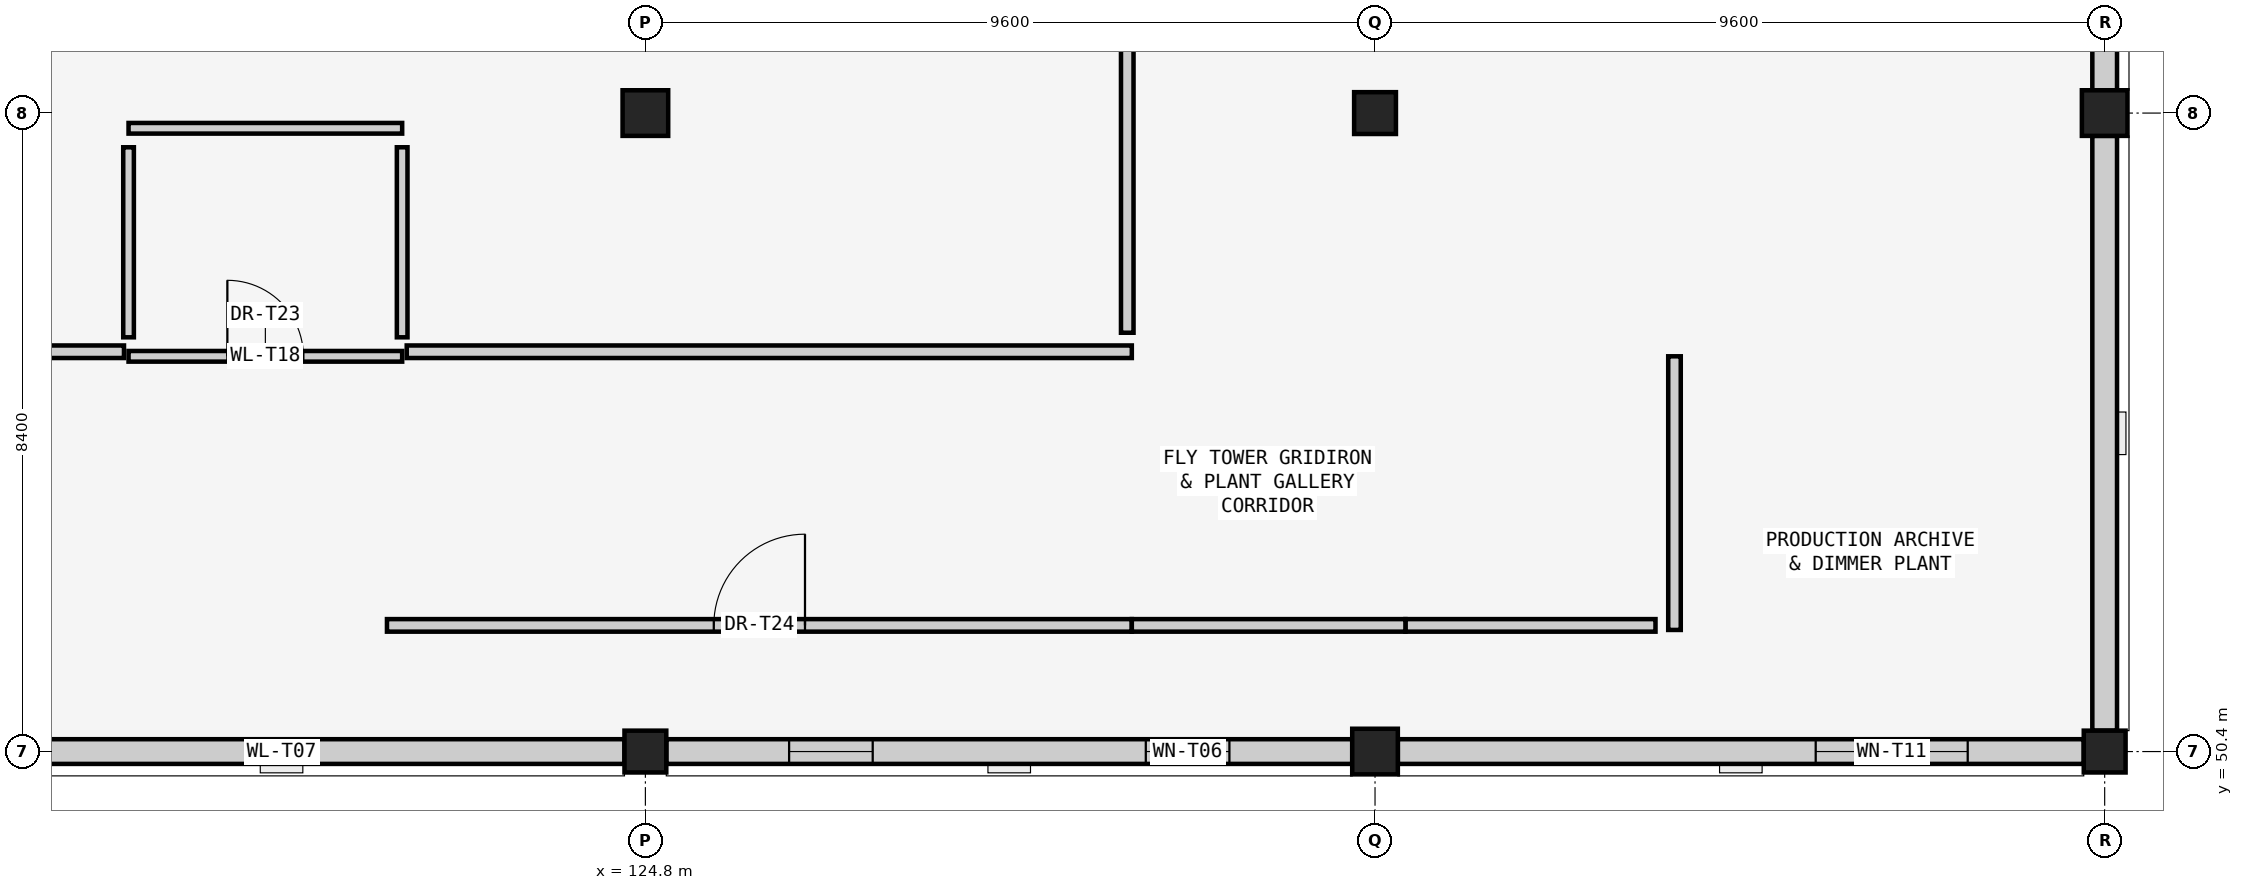
"""IFC4 building model, lengths in metres.
Left out: names, types, materials, properties, quantities, classifications, styles, units other than length and angle.
Written with IfcOpenShell. Run it as: python <this file> out.ifc"""

import sys

from ifc_helpers import new_model, si_unit, direction, frame, frame_2d, origin, origin_2d, place, context, subcontext, project, spatial, rectangle, extrude, element, fill, save


model = new_model("IFC4")
c1 = context("Model", 3, precision=1e-05, world=origin(), true_north=direction((0.0, 1.0)))
c2 = subcontext(c1, "Body", "Model", "MODEL_VIEW")
j1 = project(units=[si_unit("LENGTHUNIT", "METRE"), si_unit("PLANEANGLEUNIT", "RADIAN")], contexts=[c1])
p1 = place(None, origin())
s1 = spatial("IfcSite", under=j1, at=p1, CompositionType="ELEMENT")
p2 = place(p1, origin())
s2 = spatial("IfcBuilding", under=s1, at=p2, CompositionType="ELEMENT")
p3 = place(p2, frame((0.0, 0.0, 24.6)))
s3 = spatial("IfcBuildingStorey", under=s2, at=p3, CompositionType="ELEMENT", Elevation=24.6)
p4 = place(p3, frame((124.8, 50.4, 0.0), z_axis=(0.0, 0.0, 1.0), x_axis=(1.0, 0.0, 0.0)))
e1 = element("IfcColumn", 1, at=p4, inside=s3, PredefinedType="COLUMN", context=c2, shape_type="SweptSolid", body=[
    extrude(rectangle(XDim=0.55, YDim=0.55, at=origin_2d()), origin(), (0.0, 0.0, 1.0), 6.33),
])
for number, where, z_axis, x_axis in (
    (2, (124.8, 58.8, 0.0), (0.0, 0.0, 1.0), (1.0, 0.0, 0.0)),
    (3, (134.4, 50.4, 0.0), (0.0, 0.0, 1.0), (1.0, 0.0, 0.0)),
):
    element("IfcColumn", number, at=place(p3, frame(where, z_axis=z_axis, x_axis=x_axis)), inside=s3, PredefinedType="COLUMN", context=c2, shape_type="SweptSolid", body=[
        extrude(rectangle(XDim=0.6, YDim=0.6, at=origin_2d()), origin(), (0.0, 0.0, 1.0), 6.33),
    ])
for number, where, z_axis, x_axis in (
    (4, (134.4, 58.8, 0.0), (0.0, 0.0, 1.0), (1.0, 0.0, 0.0)),
    (5, (144.0, 50.4, 0.0), (0.0, 0.0, 1.0), (1.0, 0.0, 0.0)),
):
    element("IfcColumn", number, at=place(p3, frame(where, z_axis=z_axis, x_axis=x_axis)), inside=s3, PredefinedType="COLUMN", context=c2, shape_type="SweptSolid", body=[
        extrude(rectangle(XDim=0.55, YDim=0.55, at=origin_2d()), origin(), (0.0, 0.0, 1.0), 6.33),
    ])
p5 = place(p3, frame((144.0, 58.8, 0.0), z_axis=(0.0, 0.0, 1.0), x_axis=(1.0, 0.0, 0.0)))
e6 = element("IfcColumn", 6, at=p5, inside=s3, PredefinedType="COLUMN", context=c2, shape_type="SweptSolid", body=[
    extrude(rectangle(XDim=0.6, YDim=0.6, at=origin_2d()), origin(), (0.0, 0.0, 1.0), 6.33),
])
p6 = place(p3, frame((124.525, 50.4, 0.0), z_axis=(0.0, 0.0, 1.0), x_axis=(-1.0, 0.0, 0.0)))
e7 = element("IfcWall", 7, at=p6, inside=s3, PredefinedType="SOLIDWALL", context=c2, shape_type="SweptSolid", body=[
    extrude(rectangle(XDim=9.025, YDim=0.325, at=frame_2d((4.512, 0.0))), origin(), (0.0, 0.0, 1.0), 5.529),
])
p7 = place(p3, frame((134.1, 50.4, 0.0), z_axis=(0.0, 0.0, 1.0), x_axis=(-1.0, 0.0, 0.0)))
e8 = element("IfcWall", 8, at=p7, inside=s3, PredefinedType="SOLIDWALL", context=c2, shape_type="SweptSolid", body=[
    extrude(rectangle(XDim=9.025, YDim=0.325, at=frame_2d((4.513, 0.0))), origin(), (0.0, 0.0, 1.0), 5.607),
])
p8 = place(p7, frame((1.616, 0.0, 1.05)))
e9 = element("IfcOpeningElement", 9, at=p8, cuts=e8, PredefinedType="OPENING", context=c2, shape_type="SweptSolid", body=[
    extrude(rectangle(XDim=1.1, YDim=1.8, at=frame_2d((0.55, 0.9))), frame((0.0, 0.172, 0.0), z_axis=(0.0, -1.0, 0.0), x_axis=(1.0, 0.0, 0.0)), (0.0, 0.0, 1.0), 0.345),
])
p9 = place(p7, frame((6.309, 0.0, 1.05)))
e10 = element("IfcOpeningElement", 10, at=p9, cuts=e8, PredefinedType="OPENING", context=c2, shape_type="SweptSolid", body=[
    extrude(rectangle(XDim=1.1, YDim=1.8, at=frame_2d((0.55, 0.9))), frame((0.0, 0.172, 0.0), z_axis=(0.0, -1.0, 0.0), x_axis=(1.0, 0.0, 0.0)), (0.0, 0.0, 1.0), 0.345),
])
p10 = place(p3, frame((143.725, 50.4, 0.0), z_axis=(0.0, 0.0, 1.0), x_axis=(-1.0, 0.0, 0.0)))
e11 = element("IfcWall", 11, at=p10, inside=s3, PredefinedType="SOLIDWALL", context=c2, shape_type="SweptSolid", body=[
    extrude(rectangle(XDim=9.025, YDim=0.325, at=frame_2d((4.513, 0.0))), origin(), (0.0, 0.0, 1.0), 5.529),
])
p11 = place(p10, frame((1.527, 0.0, 1.9)))
e12 = element("IfcOpeningElement", 12, at=p11, cuts=e11, PredefinedType="OPENING", context=c2, shape_type="SweptSolid", body=[
    extrude(rectangle(XDim=2.0, YDim=1.5, at=frame_2d((1.0, 0.75))), frame((0.0, 0.172, 0.0), z_axis=(0.0, -1.0, 0.0), x_axis=(1.0, 0.0, 0.0)), (0.0, 0.0, 1.0), 0.345),
])
for number, where, z_axis, x_axis in (
    (13, (144.0, 58.5, 0.0), (0.0, 0.0, 1.0), (0.0, -1.0, 0.0)),
    (14, (144.0, 66.925, 0.0), (0.0, 0.0, 1.0), (0.0, -1.0, 0.0)),
):
    element("IfcWall", number, at=place(p3, frame(where, z_axis=z_axis, x_axis=x_axis)), inside=s3, PredefinedType="SOLIDWALL", context=c2, shape_type="SweptSolid", body=[
        extrude(rectangle(XDim=7.825, YDim=0.325, at=frame_2d((3.913, 0.0))), origin(), (0.0, 0.0, 1.0), 5.978),
    ])
p12 = place(p3, frame((118.0, 55.6, 0.0), z_axis=(0.0, 0.0, 1.0), x_axis=(1.0, 0.0, 0.0)))
e15 = element("IfcWall", 15, at=p12, inside=s3, PredefinedType="PARTITIONING", context=c2, shape_type="SweptSolid", body=[
    extrude(rectangle(XDim=3.6, YDim=0.14, at=frame_2d((1.8, 0.0))), origin(), (0.0, 0.0, 1.0), 6.12),
])
p13 = place(p12, frame((1.3, 0.0, 0.0)))
e16 = element("IfcOpeningElement", 16, at=p13, cuts=e15, PredefinedType="OPENING", context=c2, shape_type="SweptSolid", body=[
    extrude(rectangle(XDim=1.0, YDim=2.15, at=frame_2d((0.5, 1.075))), frame((0.0, 0.08, 0.0), z_axis=(0.0, -1.0, 0.0), x_axis=(1.0, 0.0, 0.0)), (0.0, 0.0, 1.0), 0.16),
])
p14 = place(p3, frame((118.0, 58.6, 0.0), z_axis=(0.0, 0.0, 1.0), x_axis=(1.0, 0.0, 0.0)))
e17 = element("IfcWall", 17, at=p14, inside=s3, PredefinedType="PARTITIONING", context=c2, shape_type="SweptSolid", body=[
    extrude(rectangle(XDim=3.6, YDim=0.14, at=frame_2d((1.8, 0.0))), origin(), (0.0, 0.0, 1.0), 6.12),
])
for number, where, z_axis, x_axis in (
    (18, (118.0, 55.85, 0.0), (0.0, 0.0, 1.0), (0.0, 1.0, 0.0)),
    (19, (121.6, 55.85, 0.0), (0.0, 0.0, 1.0), (0.0, 1.0, 0.0)),
):
    element("IfcWall", number, at=place(p3, frame(where, z_axis=z_axis, x_axis=x_axis)), inside=s3, PredefinedType="PARTITIONING", context=c2, shape_type="SweptSolid", body=[
        extrude(rectangle(XDim=2.5, YDim=0.14, at=frame_2d((1.25, 0.0))), origin(), (0.0, 0.0, 1.0), 6.12),
    ])
p15 = place(p3, frame((109.71, 55.66, 0.0), z_axis=(0.0, 0.0, 1.0), x_axis=(1.0, 0.0, 0.0)))
e20 = element("IfcWall", 20, at=p15, inside=s3, PredefinedType="PARTITIONING", context=c2, shape_type="SweptSolid", body=[
    extrude(rectangle(XDim=8.23, YDim=0.165, at=frame_2d((4.115, 0.0))), origin(), (0.0, 0.0, 1.0), 6.28),
])
p16 = place(p3, frame((121.66, 55.66, 0.0), z_axis=(0.0, 0.0, 1.0), x_axis=(1.0, 0.0, 0.0)))
e21 = element("IfcWall", 21, at=p16, inside=s3, PredefinedType="PARTITIONING", context=c2, shape_type="SweptSolid", body=[
    extrude(rectangle(XDim=9.54, YDim=0.165, at=frame_2d((4.77, 0.0))), origin(), (0.0, 0.0, 1.0), 6.28),
])
p17 = place(p3, frame((131.14, 55.91, 0.0), z_axis=(0.0, 0.0, 1.0), x_axis=(0.0, 1.0, 0.0)))
e22 = element("IfcWall", 22, at=p17, inside=s3, PredefinedType="PARTITIONING", context=c2, shape_type="SweptSolid", body=[
    extrude(rectangle(XDim=4.49, YDim=0.165, at=frame_2d((2.245, 0.0))), origin(), (0.0, 0.0, 1.0), 6.28),
])
p18 = place(p3, frame((121.4, 52.06, 0.0), z_axis=(0.0, 0.0, 1.0), x_axis=(1.0, 0.0, 0.0)))
e23 = element("IfcWall", 23, at=p18, inside=s3, PredefinedType="PARTITIONING", context=c2, shape_type="SweptSolid", body=[
    extrude(rectangle(XDim=9.8, YDim=0.165, at=frame_2d((4.9, 0.0))), origin(), (0.0, 0.0, 1.0), 6.28),
])
p19 = place(p18, frame((4.3, 0.0, 0.0)))
e24 = element("IfcOpeningElement", 24, at=p19, cuts=e23, PredefinedType="OPENING", context=c2, shape_type="SweptSolid", body=[
    extrude(rectangle(XDim=1.2, YDim=2.2, at=frame_2d((0.6, 1.1))), frame((0.0, 0.093, 0.0), z_axis=(0.0, -1.0, 0.0), x_axis=(1.0, 0.0, 0.0)), (0.0, 0.0, 1.0), 0.185),
])
p20 = place(p3, frame((138.34, 52.0, 0.0), z_axis=(0.0, 0.0, 1.0), x_axis=(0.0, 1.0, 0.0)))
e25 = element("IfcWall", 25, at=p20, inside=s3, PredefinedType="PARTITIONING", context=c2, shape_type="SweptSolid", body=[
    extrude(rectangle(XDim=3.6, YDim=0.165, at=frame_2d((1.8, 0.0))), origin(), (0.0, 0.0, 1.0), 6.28),
])
p21 = place(p3, frame((134.8, 52.06, 0.0), z_axis=(0.0, 0.0, 1.0), x_axis=(1.0, 0.0, 0.0)))
e26 = element("IfcWall", 26, at=p21, inside=s3, PredefinedType="PARTITIONING", context=c2, shape_type="SweptSolid", body=[
    extrude(rectangle(XDim=3.29, YDim=0.165, at=frame_2d((1.645, 0.0))), origin(), (0.0, 0.0, 1.0), 6.28),
])
p22 = place(p3, frame((131.2, 52.06, 0.0), z_axis=(0.0, 0.0, 1.0), x_axis=(1.0, 0.0, 0.0)))
e27 = element("IfcWall", 27, at=p22, inside=s3, PredefinedType="PARTITIONING", context=c2, shape_type="SweptSolid", body=[
    extrude(rectangle(XDim=3.6, YDim=0.165, at=frame_2d((1.8, 0.0))), origin(), (0.0, 0.0, 1.0), 6.28),
])
p23 = place(p8, origin())
e28 = element("IfcWindow", 28, at=p23, inside=s3, PartitioningType="SINGLE_PANEL", PredefinedType="WINDOW", context=c2, shape_type="SweptSolid", body=[
    extrude(rectangle(XDim=1.1, YDim=1.8, at=frame_2d((0.55, 0.9))), frame((0.0, 0.03, 0.0), z_axis=(0.0, -1.0, 0.0), x_axis=(1.0, 0.0, 0.0)), (0.0, 0.0, 1.0), 0.06),
])
fill(e9, e28)
p24 = place(p9, origin())
e29 = element("IfcWindow", 29, at=p24, inside=s3, PartitioningType="SINGLE_PANEL", PredefinedType="WINDOW", context=c2, shape_type="SweptSolid", body=[
    extrude(rectangle(XDim=1.1, YDim=1.8, at=frame_2d((0.55, 0.9))), frame((0.0, 0.03, 0.0), z_axis=(0.0, -1.0, 0.0), x_axis=(1.0, 0.0, 0.0)), (0.0, 0.0, 1.0), 0.06),
])
fill(e10, e29)
p25 = place(p11, origin())
e30 = element("IfcWindow", 30, at=p25, inside=s3, PartitioningType="SINGLE_PANEL", PredefinedType="WINDOW", context=c2, shape_type="SweptSolid", body=[
    extrude(rectangle(XDim=2.0, YDim=1.5, at=frame_2d((1.0, 0.75))), frame((0.0, 0.03, 0.0), z_axis=(0.0, -1.0, 0.0), x_axis=(1.0, 0.0, 0.0)), (0.0, 0.0, 1.0), 0.06),
])
fill(e12, e30)
p26 = place(p13, origin())
e31 = element("IfcDoor", 31, at=p26, inside=s3, OperationType="SINGLE_SWING_LEFT", PredefinedType="DOOR", context=c2, shape_type="SweptSolid", body=[
    extrude(rectangle(XDim=1.0, YDim=2.15, at=frame_2d((0.5, 1.075))), frame((0.0, 0.025, 0.0), z_axis=(0.0, -1.0, 0.0), x_axis=(1.0, 0.0, 0.0)), (0.0, 0.0, 1.0), 0.05),
])
fill(e16, e31)
p27 = place(p19, origin())
e32 = element("IfcDoor", 32, at=p27, inside=s3, OperationType="SINGLE_SWING_RIGHT", PredefinedType="DOOR", context=c2, shape_type="SweptSolid", body=[
    extrude(rectangle(XDim=1.2, YDim=2.2, at=frame_2d((0.6, 1.1))), frame((0.0, 0.025, 0.0), z_axis=(0.0, -1.0, 0.0), x_axis=(1.0, 0.0, 0.0)), (0.0, 0.0, 1.0), 0.05),
])
fill(e24, e32)
save(model, sys.argv[1])
